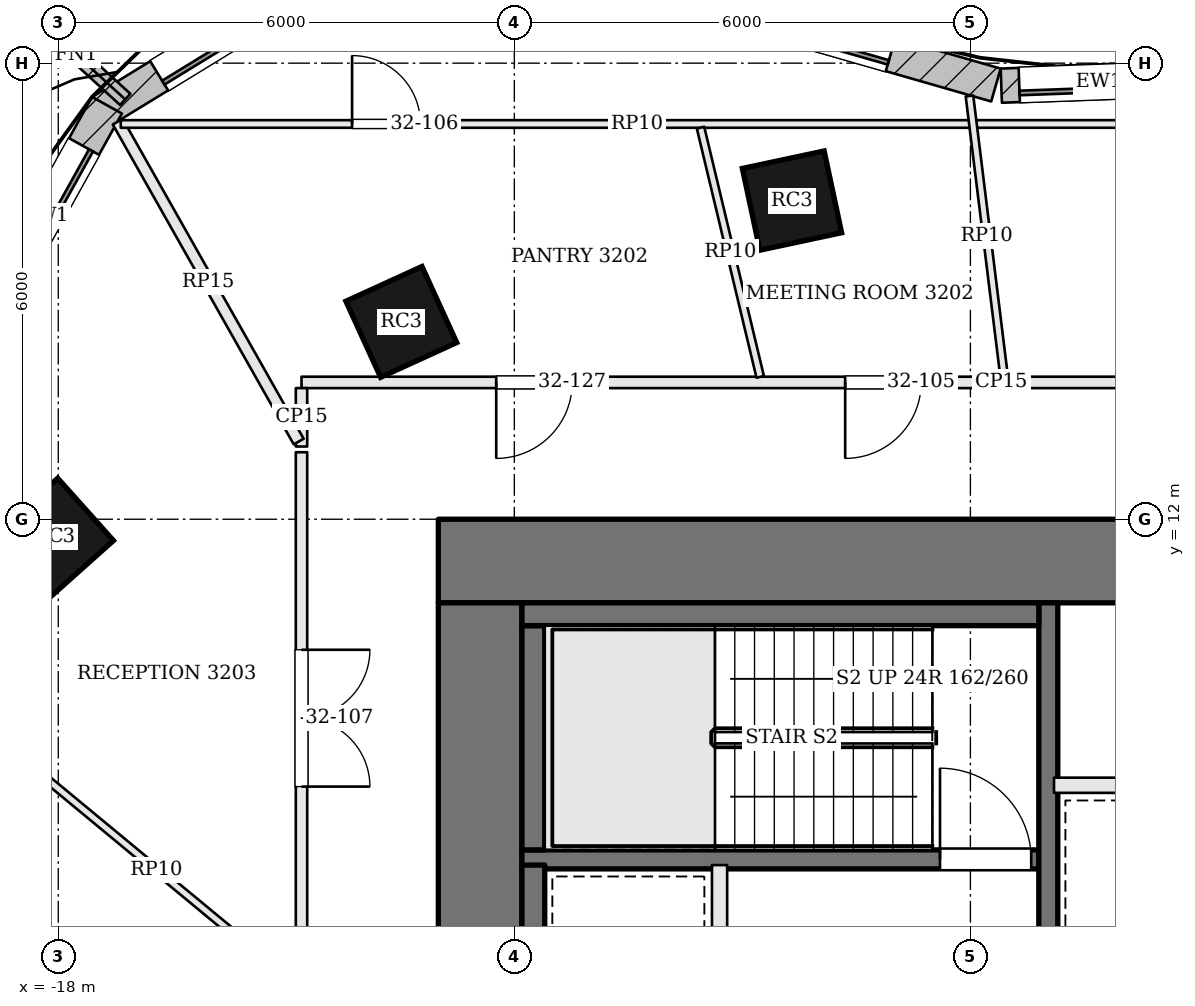
"""IFC4 building model, lengths in metres.
Left out: names, types, materials, properties, quantities, classifications, styles, units other than length and angle.
Written with IfcOpenShell. Run it as: python <this file> out.ifc"""

import sys

from ifc_helpers import new_model, si_unit, direction, frame, frame_2d, origin, origin_2d, place, context, subcontext, project, spatial, rectangle, extrude, element, fill, save


model = new_model("IFC4")
c1 = context("Model", 3, precision=1e-05, world=origin(), true_north=direction((0.0, 1.0)))
c2 = subcontext(c1, "Body", "Model", "MODEL_VIEW")
j1 = project(units=[si_unit("LENGTHUNIT", "METRE"), si_unit("PLANEANGLEUNIT", "RADIAN")], contexts=[c1])
p1 = place(None, origin())
s1 = spatial("IfcSite", under=j1, at=p1, CompositionType="ELEMENT")
p2 = place(p1, origin())
s2 = spatial("IfcBuilding", under=s1, at=p2, CompositionType="ELEMENT")
p3 = place(p2, frame((0.0, 0.0, 134.4)))
s3 = spatial("IfcBuildingStorey", under=s2, at=p3, CompositionType="ELEMENT", Elevation=134.4)
p4 = place(p3, frame((-13.0, 11.45, 0.0), z_axis=(0.0, 0.0, 1.0), x_axis=(1.0, 0.0, 0.0)))
e1 = element("IfcWall", 1, at=p4, inside=s3, PredefinedType="SHEAR", context=c2, shape_type="SweptSolid", body=[
    extrude(rectangle(XDim=26.0, YDim=1.1, at=frame_2d((13.0, 0.0))), origin(), (0.0, 0.0, 1.0), 3.9),
])
p5 = place(p4, frame((8.975, 0.0, 0.0)))
e2 = element("IfcOpeningElement", 2, at=p5, cuts=e1, PredefinedType="OPENING", context=c2, shape_type="SweptSolid", body=[
    extrude(rectangle(XDim=0.7, YDim=2.1, at=frame_2d((0.35, 1.05))), frame((0.0, 0.56, 0.0), z_axis=(0.0, -1.0, 0.0), x_axis=(1.0, 0.0, 0.0)), (0.0, 0.0, 1.0), 1.12),
])
p6 = place(p4, frame((11.425, 0.0, 0.0)))
e3 = element("IfcOpeningElement", 3, at=p6, cuts=e1, PredefinedType="OPENING", context=c2, shape_type="SweptSolid", body=[
    extrude(rectangle(XDim=0.7, YDim=2.1, at=frame_2d((0.35, 1.05))), frame((0.0, 0.56, 0.0), z_axis=(0.0, -1.0, 0.0), x_axis=(1.0, 0.0, 0.0)), (0.0, 0.0, 1.0), 1.12),
])
p7 = place(p4, frame((13.725, 0.0, 0.0)))
e4 = element("IfcOpeningElement", 4, at=p7, cuts=e1, PredefinedType="OPENING", context=c2, shape_type="SweptSolid", body=[
    extrude(rectangle(XDim=1.0, YDim=2.1, at=frame_2d((0.5, 1.05))), frame((0.0, 0.56, 0.0), z_axis=(0.0, -1.0, 0.0), x_axis=(1.0, 0.0, 0.0)), (0.0, 0.0, 1.0), 1.12),
])
p8 = place(p4, frame((16.175, 0.0, 0.0)))
e5 = element("IfcOpeningElement", 5, at=p8, cuts=e1, PredefinedType="OPENING", context=c2, shape_type="SweptSolid", body=[
    extrude(rectangle(XDim=1.0, YDim=2.1, at=frame_2d((0.5, 1.05))), frame((0.0, 0.56, 0.0), z_axis=(0.0, -1.0, 0.0), x_axis=(1.0, 0.0, 0.0)), (0.0, 0.0, 1.0), 1.12),
])
p9 = place(p3, frame((-12.45, -1.9, 0.0), z_axis=(0.0, 0.0, 1.0), x_axis=(0.0, 1.0, 0.0)))
e6 = element("IfcWall", 6, at=p9, inside=s3, PredefinedType="SHEAR", context=c2, shape_type="SweptSolid", body=[
    extrude(rectangle(XDim=12.8, YDim=1.1, at=frame_2d((6.4, 0.0))), origin(), (0.0, 0.0, 1.0), 3.9),
])
p10 = place(p9, frame((3.9, 0.0, 0.0)))
e7 = element("IfcOpeningElement", 7, at=p10, cuts=e6, PredefinedType="OPENING", context=c2, shape_type="SweptSolid", body=[
    extrude(rectangle(XDim=1.8, YDim=2.1, at=frame_2d((0.9, 1.05))), frame((0.0, 0.56, 0.0), z_axis=(0.0, -1.0, 0.0), x_axis=(1.0, 0.0, 0.0)), (0.0, 0.0, 1.0), 1.12),
])
for number, where, z_axis, x_axis in (
    (8, (-8.347, 16.192, 0.0), (0.0, 0.0, 1.0), (-0.978, -0.209, 0.0)),
    (9, (-13.487, 14.596, 0.0), (0.0, 0.0, 1.0), (-0.91, -0.415, 0.0)),
    (10, (-18.051, 11.763, 0.0), (0.0, 0.0, 1.0), (-0.746, -0.666, 0.0)),
):
    element("IfcColumn", number, at=place(p3, frame(where, z_axis=z_axis, x_axis=x_axis)), inside=s3, PredefinedType="COLUMN", context=c2, shape_type="SweptSolid", body=[
        extrude(rectangle(XDim=1.1, YDim=1.1, at=origin_2d()), origin(), (0.0, 0.0, 1.0), 3.9),
    ])
p11 = place(p3, frame((-3.022, 17.798, 0.0), z_axis=(0.0, 0.0, 1.0), x_axis=(-0.999339560591, -0.036337895349, 0.0)))
e11 = element("IfcWall", 11, at=p11, inside=s3, PredefinedType="SOLIDWALL", context=c2, shape_type="SweptSolid", body=[
    extrude(rectangle(XDim=2.573, YDim=0.45, at=frame_2d((1.287, 0.0))), origin(), (0.0, 0.0, 1.0), 3.7),
])
p12 = place(p11, frame((0.237, 0.0, 0.9)))
e12 = element("IfcOpeningElement", 12, at=p12, cuts=e11, PredefinedType="OPENING", context=c2, shape_type="SweptSolid", body=[
    extrude(rectangle(XDim=2.1, YDim=2.3, at=frame_2d((1.05, 1.15))), frame((0.0, 0.235, 0.0), z_axis=(0.0, -1.0, 0.0), x_axis=(1.0, 0.0, 0.0)), (0.0, 0.0, 1.0), 0.47),
])
p13 = place(p3, frame((-5.664, 17.713, 0.0), z_axis=(0.0, 0.0, 1.0), x_axis=(-0.961108031684, 0.276172684083, 0.0)))
e13 = element("IfcWall", 13, at=p13, inside=s3, PredefinedType="SOLIDWALL", context=c2, shape_type="SweptSolid", body=[
    extrude(rectangle(XDim=4.686, YDim=0.45, at=frame_2d((2.343, 0.0))), origin(), (0.0, 0.0, 1.0), 3.7),
])
p14 = place(p13, frame((1.443, 0.0, 0.9)))
e14 = element("IfcOpeningElement", 14, at=p14, cuts=e13, PredefinedType="OPENING", context=c2, shape_type="SweptSolid", body=[
    extrude(rectangle(XDim=1.8, YDim=2.3, at=frame_2d((0.9, 1.15))), frame((0.0, 0.235, 0.0), z_axis=(0.0, -1.0, 0.0), x_axis=(1.0, 0.0, 0.0)), (0.0, 0.0, 1.0), 0.47),
])
p15 = place(p3, frame((-14.116, 19.4, 0.0), z_axis=(0.0, 0.0, 1.0), x_axis=(-0.852622865325, -0.522526793117, 0.0)))
e15 = element("IfcWall", 15, at=p15, inside=s3, PredefinedType="SOLIDWALL", context=c2, shape_type="SweptSolid", body=[
    extrude(rectangle(XDim=3.896, YDim=0.45, at=frame_2d((1.948, 0.0))), origin(), (0.0, 0.0, 1.0), 3.7),
])
p16 = place(p15, frame((0.898, 0.0, 0.9)))
e16 = element("IfcOpeningElement", 16, at=p16, cuts=e15, PredefinedType="OPENING", context=c2, shape_type="SweptSolid", body=[
    extrude(rectangle(XDim=2.1, YDim=2.3, at=frame_2d((1.05, 1.15))), frame((0.0, 0.235, 0.0), z_axis=(0.0, -1.0, 0.0), x_axis=(1.0, 0.0, 0.0)), (0.0, 0.0, 1.0), 0.47),
])
p17 = place(p3, frame((-17.359, 17.447, 0.0), z_axis=(0.0, 0.0, 1.0), x_axis=(-0.485618126214, -0.874171056197, 0.0)))
e17 = element("IfcWall", 17, at=p17, inside=s3, PredefinedType="SOLIDWALL", context=c2, shape_type="SweptSolid", body=[
    extrude(rectangle(XDim=3.343, YDim=0.45, at=frame_2d((1.671, 0.0))), origin(), (0.0, 0.0, 1.0), 3.7),
])
p18 = place(p17, frame((0.621, 0.0, 0.9)))
e18 = element("IfcOpeningElement", 18, at=p18, cuts=e17, PredefinedType="OPENING", context=c2, shape_type="SweptSolid", body=[
    extrude(rectangle(XDim=2.1, YDim=2.3, at=frame_2d((1.05, 1.15))), frame((0.0, 0.235, 0.0), z_axis=(0.0, -1.0, 0.0), x_axis=(1.0, 0.0, 0.0)), (0.0, 0.0, 1.0), 0.47),
])
p19 = place(p3, frame((-17.119, 17.523, 0.0), z_axis=(0.0, 0.0, 1.0), x_axis=(-0.737866019047, 0.674947211221, 0.0)))
e19 = element("IfcWall", 19, at=p19, inside=s3, PredefinedType="SOLIDWALL", context=c2, shape_type="SweptSolid", body=[
    extrude(rectangle(XDim=1.75, YDim=0.2, at=frame_2d((0.875, 0.0))), origin(), (0.0, 0.0, 1.0), 3.7),
])
p20 = place(p3, frame((-11.9, 7.525, 0.0), z_axis=(0.0, 0.0, 1.0), x_axis=(1.0, 0.0, 0.0)))
e20 = element("IfcWall", 20, at=p20, inside=s3, PredefinedType="SOLIDWALL", context=c2, shape_type="SweptSolid", body=[
    extrude(rectangle(XDim=6.8, YDim=0.25, at=frame_2d((3.4, 0.0))), origin(), (0.0, 0.0, 1.0), 3.7),
])
p21 = place(p20, frame((5.5, 0.0, 0.0)))
e21 = element("IfcOpeningElement", 21, at=p21, cuts=e20, PredefinedType="OPENING", context=c2, shape_type="SweptSolid", body=[
    extrude(rectangle(XDim=1.2, YDim=2.1, at=frame_2d((0.6, 1.05))), frame((0.0, 0.135, 0.0), z_axis=(0.0, -1.0, 0.0), x_axis=(1.0, 0.0, 0.0)), (0.0, 0.0, 1.0), 0.27),
])
p22 = place(p3, frame((-9.3, 4.45, 0.0), z_axis=(0.0, 0.0, 1.0), x_axis=(0.0, 1.0, 0.0)))
e22 = element("IfcWall", 22, at=p22, inside=s3, PredefinedType="SOLIDWALL", context=c2, shape_type="SweptSolid", body=[
    extrude(rectangle(XDim=3.0, YDim=0.2, at=frame_2d((1.5, 0.0))), origin(), (0.0, 0.0, 1.0), 3.7),
])
p23 = place(p3, frame((-4.975, -1.9, 0.0), z_axis=(0.0, 0.0, 1.0), x_axis=(0.0, 1.0, 0.0)))
e23 = element("IfcWall", 23, at=p23, inside=s3, PredefinedType="SOLIDWALL", context=c2, shape_type="SweptSolid", body=[
    extrude(rectangle(XDim=12.8, YDim=0.25, at=frame_2d((6.4, 0.0))), origin(), (0.0, 0.0, 1.0), 3.7),
])
p24 = place(p23, frame((4.95, 0.0, 0.0)))
e24 = element("IfcOpeningElement", 24, at=p24, cuts=e23, PredefinedType="OPENING", context=c2, shape_type="SweptSolid", body=[
    extrude(rectangle(XDim=1.2, YDim=2.1, at=frame_2d((0.6, 1.05))), frame((0.0, 0.135, 0.0), z_axis=(0.0, -1.0, 0.0), x_axis=(1.0, 0.0, 0.0)), (0.0, 0.0, 1.0), 0.27),
])
p25 = place(p3, frame((-11.75, 4.45, 0.0), z_axis=(0.0, 0.0, 1.0), x_axis=(0.0, 1.0, 0.0)))
e25 = element("IfcWall", 25, at=p25, inside=s3, PredefinedType="SOLIDWALL", context=c2, shape_type="SweptSolid", body=[
    extrude(rectangle(XDim=3.0, YDim=0.3, at=frame_2d((1.5, 0.0))), origin(), (0.0, 0.0, 1.0), 3.7),
])
p26 = place(p3, frame((-11.75, 7.65, 0.0), z_axis=(0.0, 0.0, 1.0), x_axis=(0.0, 1.0, 0.0)))
e26 = element("IfcWall", 26, at=p26, inside=s3, PredefinedType="SOLIDWALL", context=c2, shape_type="SweptSolid", body=[
    extrude(rectangle(XDim=2.95, YDim=0.3, at=frame_2d((1.475, 0.0))), origin(), (0.0, 0.0, 1.0), 3.7),
])
p27 = place(p3, frame((-11.9, 10.75, 0.0), z_axis=(0.0, 0.0, 1.0), x_axis=(1.0, 0.0, 0.0)))
e27 = element("IfcWall", 27, at=p27, inside=s3, PredefinedType="SOLIDWALL", context=c2, shape_type="SweptSolid", body=[
    extrude(rectangle(XDim=6.8, YDim=0.3, at=frame_2d((3.4, 0.0))), origin(), (0.0, 0.0, 1.0), 3.7),
])
p28 = place(p3, frame((-4.9, 8.5, 0.0), z_axis=(0.0, 0.0, 1.0), x_axis=(1.0, 0.0, 0.0)))
e28 = element("IfcWall", 28, at=p28, inside=s3, PredefinedType="SOLIDWALL", context=c2, shape_type="SweptSolid", body=[
    extrude(rectangle(XDim=9.8, YDim=0.2, at=frame_2d((4.9, 0.0))), origin(), (0.0, 0.0, 1.0), 3.7),
])
p29 = place(p3, frame((3.012, 13.8, 0.0), z_axis=(0.0, 0.0, 1.0), x_axis=(-1.0, 0.0, 0.0)))
e29 = element("IfcWall", 29, at=p29, inside=s3, PredefinedType="PARTITIONING", context=c2, shape_type="SweptSolid", body=[
    extrude(rectangle(XDim=17.812, YDim=0.15, at=frame_2d((8.906, 0.0))), origin(), (0.0, 0.0, 1.0), 3.198),
])
p30 = place(p29, frame((3.342, 0.0, 0.0)))
e30 = element("IfcOpeningElement", 30, at=p30, cuts=e29, PredefinedType="OPENING", context=c2, shape_type="SweptSolid", body=[
    extrude(rectangle(XDim=1.8, YDim=2.1, at=frame_2d((0.9, 1.05))), frame((0.0, 0.085, 0.0), z_axis=(0.0, -1.0, 0.0), x_axis=(1.0, 0.0, 0.0)), (0.0, 0.0, 1.0), 0.17),
])
p31 = place(p29, frame((9.659, 0.0, 0.0)))
e31 = element("IfcOpeningElement", 31, at=p31, cuts=e29, PredefinedType="OPENING", context=c2, shape_type="SweptSolid", body=[
    extrude(rectangle(XDim=1.0, YDim=2.4, at=frame_2d((0.5, 1.2))), frame((0.0, 0.085, 0.0), z_axis=(0.0, -1.0, 0.0), x_axis=(1.0, 0.0, 0.0)), (0.0, 0.0, 1.0), 0.17),
])
p32 = place(p29, frame((14.25, 0.0, 0.0)))
e32 = element("IfcOpeningElement", 32, at=p32, cuts=e29, PredefinedType="OPENING", context=c2, shape_type="SweptSolid", body=[
    extrude(rectangle(XDim=1.0, YDim=2.1, at=frame_2d((0.5, 1.05))), frame((0.0, 0.085, 0.0), z_axis=(0.0, -1.0, 0.0), x_axis=(1.0, 0.0, 0.0)), (0.0, 0.0, 1.0), 0.17),
])
p33 = place(p3, frame((-14.8, 13.725, 0.0), z_axis=(0.0, 0.0, 1.0), x_axis=(0.0, -1.0, 0.0)))
e33 = element("IfcWall", 33, at=p33, inside=s3, PredefinedType="PARTITIONING", context=c2, shape_type="SweptSolid", body=[
    extrude(rectangle(XDim=0.769, YDim=0.15, at=frame_2d((0.384, 0.0))), origin(), (0.0, 0.0, 1.0), 3.198),
])
p34 = place(p3, frame((-17.218, 17.23, 0.0), z_axis=(0.0, 0.0, 1.0), x_axis=(0.492436580725, -0.870348329098, 0.0)))
e34 = element("IfcWall", 34, at=p34, inside=s3, PredefinedType="PARTITIONING", context=c2, shape_type="SweptSolid", body=[
    extrude(rectangle(XDim=4.835, YDim=0.15, at=frame_2d((2.417, 0.0))), origin(), (0.0, 0.0, 1.0), 3.198),
])
p35 = place(p3, frame((-14.8, 12.882, 0.0), z_axis=(0.0, 0.0, 1.0), x_axis=(0.0, -1.0, 0.0)))
e35 = element("IfcWall", 35, at=p35, inside=s3, PredefinedType="PARTITIONING", context=c2, shape_type="SweptSolid", body=[
    extrude(rectangle(XDim=16.652, YDim=0.15, at=frame_2d((8.326, 0.0))), origin(), (0.0, 0.0, 1.0), 3.198),
])
p36 = place(p35, frame((2.599, 0.0, 0.0)))
e36 = element("IfcOpeningElement", 36, at=p36, cuts=e35, PredefinedType="OPENING", context=c2, shape_type="SweptSolid", body=[
    extrude(rectangle(XDim=1.8, YDim=2.1, at=frame_2d((0.9, 1.05))), frame((0.0, 0.085, 0.0), z_axis=(0.0, -1.0, 0.0), x_axis=(1.0, 0.0, 0.0)), (0.0, 0.0, 1.0), 0.17),
])
p37 = place(p35, frame((9.456, 0.0, 0.0)))
e37 = element("IfcOpeningElement", 37, at=p37, cuts=e35, PredefinedType="OPENING", context=c2, shape_type="SweptSolid", body=[
    extrude(rectangle(XDim=1.0, YDim=2.4, at=frame_2d((0.5, 1.2))), frame((0.0, 0.085, 0.0), z_axis=(0.0, -1.0, 0.0), x_axis=(1.0, 0.0, 0.0)), (0.0, 0.0, 1.0), 0.17),
])
p38 = place(p35, frame((14.15, 0.0, 0.0)))
e38 = element("IfcOpeningElement", 38, at=p38, cuts=e35, PredefinedType="OPENING", context=c2, shape_type="SweptSolid", body=[
    extrude(rectangle(XDim=1.0, YDim=2.1, at=frame_2d((0.5, 1.05))), frame((0.0, 0.085, 0.0), z_axis=(0.0, -1.0, 0.0), x_axis=(1.0, 0.0, 0.0)), (0.0, 0.0, 1.0), 0.17),
])
p39 = place(p3, frame((-17.178, 17.2, 0.0), z_axis=(0.0, 0.0, 1.0), x_axis=(1.0, 0.0, 0.0)))
e39 = element("IfcWall", 39, at=p39, inside=s3, PredefinedType="PARTITIONING", context=c2, shape_type="SweptSolid", body=[
    extrude(rectangle(XDim=13.585, YDim=0.1, at=frame_2d((6.792, 0.0))), origin(), (0.0, 0.0, 1.0), 3.184),
])
p40 = place(p39, frame((3.043, 0.0, 0.0)))
e40 = element("IfcOpeningElement", 40, at=p40, cuts=e39, PredefinedType="OPENING", context=c2, shape_type="SweptSolid", body=[
    extrude(rectangle(XDim=0.9, YDim=2.1, at=frame_2d((0.45, 1.05))), frame((0.0, 0.06, 0.0), z_axis=(0.0, -1.0, 0.0), x_axis=(1.0, 0.0, 0.0)), (0.0, 0.0, 1.0), 0.12),
])
p41 = place(p3, frame((-5.556, 13.875, 0.0), z_axis=(0.0, 0.0, 1.0), x_axis=(-0.122573624649, 0.99245942312, 0.0)))
e41 = element("IfcWall", 41, at=p41, inside=s3, PredefinedType="PARTITIONING", context=c2, shape_type="SweptSolid", body=[
    extrude(rectangle(XDim=3.723, YDim=0.1, at=frame_2d((1.861, 0.0))), origin(), (0.0, 0.0, 1.0), 3.184),
])
p42 = place(p3, frame((-8.765, 13.873, 0.0), z_axis=(0.0, 0.0, 1.0), x_axis=(-0.232827854215, 0.972517963999, 0.0)))
e42 = element("IfcWall", 42, at=p42, inside=s3, PredefinedType="PARTITIONING", context=c2, shape_type="SweptSolid", body=[
    extrude(rectangle(XDim=3.371, YDim=0.1, at=frame_2d((1.686, 0.0))), origin(), (0.0, 0.0, 1.0), 3.184),
])
p43 = place(p3, frame((-14.858, 5.857, 0.0), z_axis=(0.0, 0.0, 1.0), x_axis=(-0.770605931108, 0.637311932213, 0.0)))
e43 = element("IfcWall", 43, at=p43, inside=s3, PredefinedType="PARTITIONING", context=c2, shape_type="SweptSolid", body=[
    extrude(rectangle(XDim=4.806, YDim=0.1, at=frame_2d((2.403, 0.0))), origin(), (0.0, 0.0, 1.0), 3.184),
])
p44 = place(p12, origin())
e44 = element("IfcWindow", 44, at=p44, inside=s3, PartitioningType="SINGLE_PANEL", PredefinedType="WINDOW", context=c2, shape_type="SweptSolid", body=[
    extrude(rectangle(XDim=2.1, YDim=2.3, at=frame_2d((1.05, 1.15))), frame((0.0, 0.135, 0.0), z_axis=(0.0, -1.0, 0.0), x_axis=(1.0, 0.0, 0.0)), (0.0, 0.0, 1.0), 0.06),
])
fill(e12, e44)
p45 = place(p14, origin())
e45 = element("IfcWindow", 45, at=p45, inside=s3, PartitioningType="SINGLE_PANEL", PredefinedType="WINDOW", context=c2, shape_type="SweptSolid", body=[
    extrude(rectangle(XDim=1.8, YDim=2.3, at=frame_2d((0.9, 1.15))), frame((0.0, 0.135, 0.0), z_axis=(0.0, -1.0, 0.0), x_axis=(1.0, 0.0, 0.0)), (0.0, 0.0, 1.0), 0.06),
])
fill(e14, e45)
p46 = place(p16, origin())
e46 = element("IfcWindow", 46, at=p46, inside=s3, PartitioningType="SINGLE_PANEL", PredefinedType="WINDOW", context=c2, shape_type="SweptSolid", body=[
    extrude(rectangle(XDim=2.1, YDim=2.3, at=frame_2d((1.05, 1.15))), frame((0.0, 0.135, 0.0), z_axis=(0.0, -1.0, 0.0), x_axis=(1.0, 0.0, 0.0)), (0.0, 0.0, 1.0), 0.06),
])
fill(e16, e46)
p47 = place(p18, origin())
e47 = element("IfcWindow", 47, at=p47, inside=s3, PartitioningType="SINGLE_PANEL", PredefinedType="WINDOW", context=c2, shape_type="SweptSolid", body=[
    extrude(rectangle(XDim=2.1, YDim=2.3, at=frame_2d((1.05, 1.15))), frame((0.0, 0.135, 0.0), z_axis=(0.0, -1.0, 0.0), x_axis=(1.0, 0.0, 0.0)), (0.0, 0.0, 1.0), 0.06),
])
fill(e18, e47)
p48 = place(p21, origin())
e48 = element("IfcDoor", 48, at=p48, inside=s3, OperationType="SINGLE_SWING_LEFT", PredefinedType="DOOR", context=c2, shape_type="SweptSolid", body=[
    extrude(rectangle(XDim=1.2, YDim=2.1, at=frame_2d((0.6, 1.05))), frame((0.0, 0.025, 0.0), z_axis=(0.0, -1.0, 0.0), x_axis=(1.0, 0.0, 0.0)), (0.0, 0.0, 1.0), 0.05),
])
fill(e21, e48)
p49 = place(p31, origin())
e49 = element("IfcDoor", 49, at=p49, inside=s3, OperationType="SINGLE_SWING_RIGHT", PredefinedType="DOOR", context=c2, shape_type="SweptSolid", body=[
    extrude(rectangle(XDim=1.0, YDim=2.4, at=frame_2d((0.5, 1.2))), frame((0.0, 0.025, 0.0), z_axis=(0.0, -1.0, 0.0), x_axis=(1.0, 0.0, 0.0)), (0.0, 0.0, 1.0), 0.05),
])
fill(e31, e49)
p50 = place(p40, origin())
e50 = element("IfcDoor", 50, at=p50, inside=s3, OperationType="SINGLE_SWING_LEFT", PredefinedType="DOOR", context=c2, shape_type="SweptSolid", body=[
    extrude(rectangle(XDim=0.9, YDim=2.1, at=frame_2d((0.45, 1.05))), frame((0.0, 0.025, 0.0), z_axis=(0.0, -1.0, 0.0), x_axis=(1.0, 0.0, 0.0)), (0.0, 0.0, 1.0), 0.05),
])
fill(e40, e50)
p51 = place(p36, origin())
e51 = element("IfcDoor", 51, at=p51, inside=s3, OperationType="DOUBLE_DOOR_SINGLE_SWING", PredefinedType="DOOR", context=c2, shape_type="SweptSolid", body=[
    extrude(rectangle(XDim=1.8, YDim=2.1, at=frame_2d((0.9, 1.05))), frame((0.0, 0.025, 0.0), z_axis=(0.0, -1.0, 0.0), x_axis=(1.0, 0.0, 0.0)), (0.0, 0.0, 1.0), 0.05),
])
fill(e36, e51)
p52 = place(p32, origin())
e52 = element("IfcDoor", 52, at=p52, inside=s3, OperationType="SINGLE_SWING_RIGHT", PredefinedType="DOOR", context=c2, shape_type="SweptSolid", body=[
    extrude(rectangle(XDim=1.0, YDim=2.1, at=frame_2d((0.5, 1.05))), frame((0.0, 0.025, 0.0), z_axis=(0.0, -1.0, 0.0), x_axis=(1.0, 0.0, 0.0)), (0.0, 0.0, 1.0), 0.05),
])
fill(e32, e52)
save(model, sys.argv[1])
